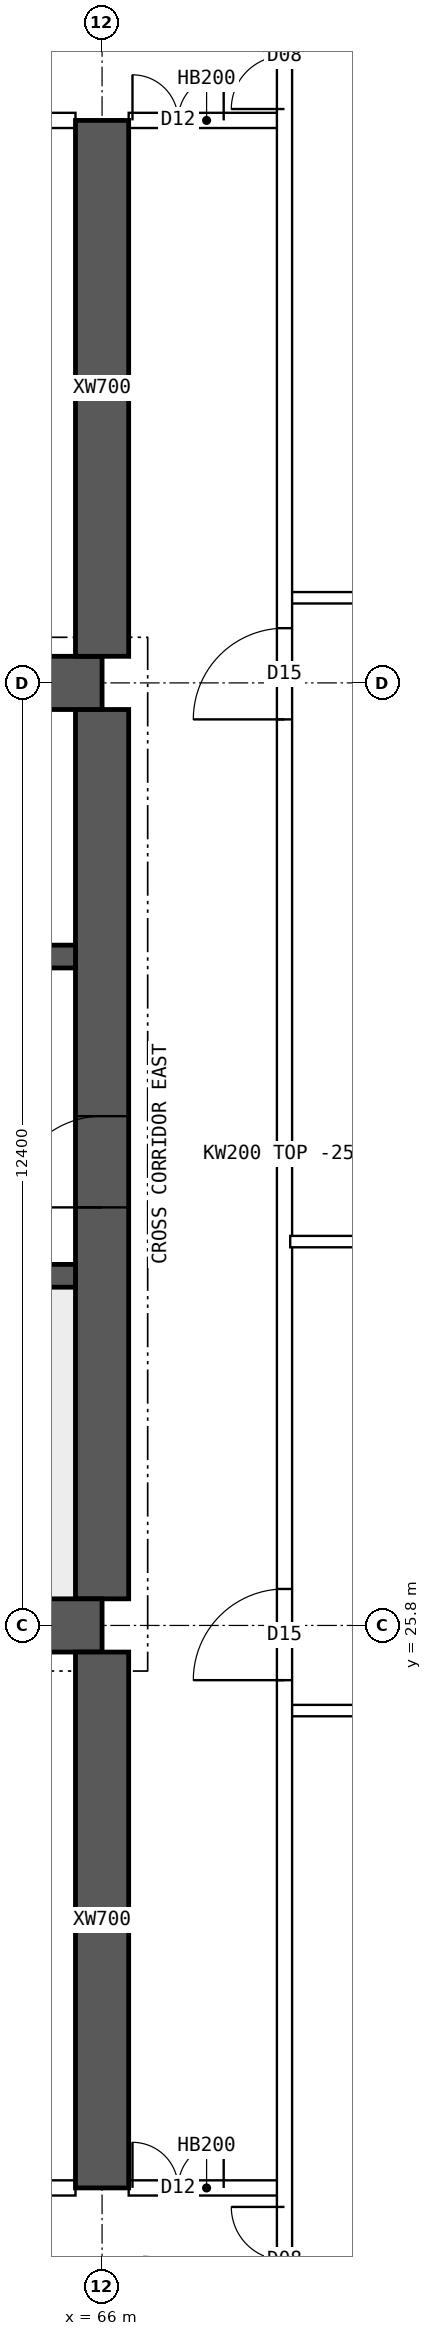
"""IFC4 building model, lengths in metres.
Left out: names, types, materials, properties, quantities, classifications, styles, units other than length and angle.
Written with IfcOpenShell. Run it as: python <this file> out.ifc"""

import sys

from ifc_helpers import new_model, si_unit, direction, frame, frame_2d, origin, place, context, subcontext, project, spatial, polyline, rectangle, outline, extrude, element, fill, save


model = new_model("IFC4")
c1 = context("Model", 3, precision=1e-05, world=origin(), true_north=direction((0.0, 1.0)))
c2 = subcontext(c1, "Body", "Model", "MODEL_VIEW")
j1 = project(units=[si_unit("LENGTHUNIT", "METRE"), si_unit("PLANEANGLEUNIT", "RADIAN")], contexts=[c1])
p1 = place(None, origin())
s1 = spatial("IfcSite", under=j1, at=p1, CompositionType="ELEMENT")
p2 = place(p1, origin())
s2 = spatial("IfcBuilding", under=s1, at=p2, CompositionType="ELEMENT")
p3 = place(p2, frame((0.0, 0.0, 220.3)))
s3 = spatial("IfcBuildingStorey", under=s2, at=p3, CompositionType="ELEMENT", Elevation=220.3)
for number, where, z_axis, x_axis in (
    (1, (18.0, 25.8, 0.0), (0.0, 0.0, 1.0), (1.0, 0.0, 0.0)),
    (2, (18.0, 38.2, 0.0), (0.0, 0.0, 1.0), (1.0, 0.0, 0.0)),
):
    element("IfcWall", number, at=place(p3, frame(where, z_axis=z_axis, x_axis=x_axis)), inside=s3, PredefinedType="SHEAR", context=c2, shape_type="SweptSolid", body=[
        extrude(rectangle(XDim=48.0, YDim=0.7, at=frame_2d((24.0, 0.0))), origin(), (0.0, 0.0, 1.0), 3.75),
    ])
p4 = place(p3, frame((66.0, 26.15, 0.0), z_axis=(0.0, 0.0, 1.0), x_axis=(0.0, 1.0, 0.0)))
e3 = element("IfcWall", 3, at=p4, inside=s3, PredefinedType="SHEAR", context=c2, shape_type="SweptSolid", body=[
    extrude(rectangle(XDim=11.7, YDim=0.7, at=frame_2d((5.85, 0.0))), origin(), (0.0, 0.0, 1.0), 3.75),
])
p5 = place(p4, frame((5.15, 0.0, 0.0)))
e4 = element("IfcOpeningElement", 4, at=p5, cuts=e3, PredefinedType="OPENING", context=c2, shape_type="SweptSolid", body=[
    extrude(rectangle(XDim=1.2, YDim=2.1, at=frame_2d((0.6, 1.05))), frame((0.0, 0.36, 0.0), z_axis=(0.0, -1.0, 0.0), x_axis=(1.0, 0.0, 0.0)), (0.0, 0.0, 1.0), 0.72),
])
p6 = place(p3, frame((18.35, 30.4, 0.0), z_axis=(0.0, 0.0, 1.0), x_axis=(1.0, 0.0, 0.0)))
e5 = element("IfcWall", 5, at=p6, inside=s3, PredefinedType="SHEAR", context=c2, shape_type="SweptSolid", body=[
    extrude(rectangle(XDim=47.3, YDim=0.3, at=frame_2d((23.65, 0.0))), origin(), (0.0, 0.0, 1.0), 3.75),
])
p7 = place(p6, frame((0.4, 0.0, 0.0)))
e6 = element("IfcOpeningElement", 6, at=p7, cuts=e5, PredefinedType="OPENING", context=c2, shape_type="SweptSolid", body=[
    extrude(rectangle(XDim=1.0, YDim=2.1, at=frame_2d((0.5, 1.05))), frame((0.0, 0.16, 0.0), z_axis=(0.0, -1.0, 0.0), x_axis=(1.0, 0.0, 0.0)), (0.0, 0.0, 1.0), 0.32),
])
p8 = place(p6, frame((45.9, 0.0, 0.0)))
e7 = element("IfcOpeningElement", 7, at=p8, cuts=e5, PredefinedType="OPENING", context=c2, shape_type="SweptSolid", body=[
    extrude(rectangle(XDim=1.0, YDim=2.1, at=frame_2d((0.5, 1.05))), frame((0.0, 0.16, 0.0), z_axis=(0.0, -1.0, 0.0), x_axis=(1.0, 0.0, 0.0)), (0.0, 0.0, 1.0), 0.32),
])
p9 = place(p6, frame((8.4, 0.0, 0.0)))
e8 = element("IfcOpeningElement", 8, at=p9, cuts=e5, PredefinedType="OPENING", context=c2, shape_type="SweptSolid", body=[
    extrude(rectangle(XDim=1.1, YDim=2.1, at=frame_2d((0.55, 1.05))), frame((0.0, 0.16, 0.0), z_axis=(0.0, -1.0, 0.0), x_axis=(1.0, 0.0, 0.0)), (0.0, 0.0, 1.0), 0.32),
])
p10 = place(p6, frame((11.0, 0.0, 0.0)))
e9 = element("IfcOpeningElement", 9, at=p10, cuts=e5, PredefinedType="OPENING", context=c2, shape_type="SweptSolid", body=[
    extrude(rectangle(XDim=1.1, YDim=2.1, at=frame_2d((0.55, 1.05))), frame((0.0, 0.16, 0.0), z_axis=(0.0, -1.0, 0.0), x_axis=(1.0, 0.0, 0.0)), (0.0, 0.0, 1.0), 0.32),
])
p11 = place(p6, frame((13.6, 0.0, 0.0)))
e10 = element("IfcOpeningElement", 10, at=p11, cuts=e5, PredefinedType="OPENING", context=c2, shape_type="SweptSolid", body=[
    extrude(rectangle(XDim=1.1, YDim=2.1, at=frame_2d((0.55, 1.05))), frame((0.0, 0.16, 0.0), z_axis=(0.0, -1.0, 0.0), x_axis=(1.0, 0.0, 0.0)), (0.0, 0.0, 1.0), 0.32),
])
p12 = place(p6, frame((16.2, 0.0, 0.0)))
e11 = element("IfcOpeningElement", 11, at=p12, cuts=e5, PredefinedType="OPENING", context=c2, shape_type="SweptSolid", body=[
    extrude(rectangle(XDim=1.1, YDim=2.1, at=frame_2d((0.55, 1.05))), frame((0.0, 0.16, 0.0), z_axis=(0.0, -1.0, 0.0), x_axis=(1.0, 0.0, 0.0)), (0.0, 0.0, 1.0), 0.32),
])
p13 = place(p6, frame((18.975, 0.0, 0.0)))
e12 = element("IfcOpeningElement", 12, at=p13, cuts=e5, PredefinedType="OPENING", context=c2, shape_type="SweptSolid", body=[
    extrude(rectangle(XDim=0.9, YDim=2.1, at=frame_2d((0.45, 1.05))), frame((0.0, 0.16, 0.0), z_axis=(0.0, -1.0, 0.0), x_axis=(1.0, 0.0, 0.0)), (0.0, 0.0, 1.0), 0.32),
])
p14 = place(p6, frame((24.475, 0.0, 0.0)))
e13 = element("IfcOpeningElement", 13, at=p14, cuts=e5, PredefinedType="OPENING", context=c2, shape_type="SweptSolid", body=[
    extrude(rectangle(XDim=0.9, YDim=2.1, at=frame_2d((0.45, 1.05))), frame((0.0, 0.16, 0.0), z_axis=(0.0, -1.0, 0.0), x_axis=(1.0, 0.0, 0.0)), (0.0, 0.0, 1.0), 0.32),
])
p15 = place(p6, frame((30.267, 0.0, 0.0)))
e14 = element("IfcOpeningElement", 14, at=p15, cuts=e5, PredefinedType="OPENING", context=c2, shape_type="SweptSolid", body=[
    extrude(rectangle(XDim=1.1, YDim=2.1, at=frame_2d((0.55, 1.05))), frame((0.0, 0.16, 0.0), z_axis=(0.0, -1.0, 0.0), x_axis=(1.0, 0.0, 0.0)), (0.0, 0.0, 1.0), 0.32),
])
p16 = place(p6, frame((33.8, 0.0, 0.0)))
e15 = element("IfcOpeningElement", 15, at=p16, cuts=e5, PredefinedType="OPENING", context=c2, shape_type="SweptSolid", body=[
    extrude(rectangle(XDim=1.1, YDim=2.1, at=frame_2d((0.55, 1.05))), frame((0.0, 0.16, 0.0), z_axis=(0.0, -1.0, 0.0), x_axis=(1.0, 0.0, 0.0)), (0.0, 0.0, 1.0), 0.32),
])
p17 = place(p6, frame((37.333, 0.0, 0.0)))
e16 = element("IfcOpeningElement", 16, at=p17, cuts=e5, PredefinedType="OPENING", context=c2, shape_type="SweptSolid", body=[
    extrude(rectangle(XDim=1.1, YDim=2.1, at=frame_2d((0.55, 1.05))), frame((0.0, 0.16, 0.0), z_axis=(0.0, -1.0, 0.0), x_axis=(1.0, 0.0, 0.0)), (0.0, 0.0, 1.0), 0.32),
])
p18 = place(p3, frame((18.35, 34.6, 0.0), z_axis=(0.0, 0.0, 1.0), x_axis=(1.0, 0.0, 0.0)))
e17 = element("IfcWall", 17, at=p18, inside=s3, PredefinedType="SHEAR", context=c2, shape_type="SweptSolid", body=[
    extrude(rectangle(XDim=47.3, YDim=0.3, at=frame_2d((23.65, 0.0))), origin(), (0.0, 0.0, 1.0), 3.75),
])
p19 = place(p18, frame((0.9, 0.0, 0.0)))
e18 = element("IfcOpeningElement", 18, at=p19, cuts=e17, PredefinedType="OPENING", context=c2, shape_type="SweptSolid", body=[
    extrude(rectangle(XDim=1.1, YDim=2.1, at=frame_2d((0.55, 1.05))), frame((0.0, 0.16, 0.0), z_axis=(0.0, -1.0, 0.0), x_axis=(1.0, 0.0, 0.0)), (0.0, 0.0, 1.0), 0.32),
])
p20 = place(p18, frame((45.3, 0.0, 0.0)))
e19 = element("IfcOpeningElement", 19, at=p20, cuts=e17, PredefinedType="OPENING", context=c2, shape_type="SweptSolid", body=[
    extrude(rectangle(XDim=1.1, YDim=2.1, at=frame_2d((0.55, 1.05))), frame((0.0, 0.16, 0.0), z_axis=(0.0, -1.0, 0.0), x_axis=(1.0, 0.0, 0.0)), (0.0, 0.0, 1.0), 0.32),
])
p21 = place(p18, frame((4.25, 0.0, 0.0)))
e20 = element("IfcOpeningElement", 20, at=p21, cuts=e17, PredefinedType="OPENING", context=c2, shape_type="SweptSolid", body=[
    extrude(rectangle(XDim=0.9, YDim=2.1, at=frame_2d((0.45, 1.05))), frame((0.0, 0.16, 0.0), z_axis=(0.0, -1.0, 0.0), x_axis=(1.0, 0.0, 0.0)), (0.0, 0.0, 1.0), 0.32),
])
p22 = place(p18, frame((42.15, 0.0, 0.0)))
e21 = element("IfcOpeningElement", 21, at=p22, cuts=e17, PredefinedType="OPENING", context=c2, shape_type="SweptSolid", body=[
    extrude(rectangle(XDim=0.9, YDim=2.1, at=frame_2d((0.45, 1.05))), frame((0.0, 0.16, 0.0), z_axis=(0.0, -1.0, 0.0), x_axis=(1.0, 0.0, 0.0)), (0.0, 0.0, 1.0), 0.32),
])
p23 = place(p18, frame((9.025, 0.0, 0.0)))
e22 = element("IfcOpeningElement", 22, at=p23, cuts=e17, PredefinedType="OPENING", context=c2, shape_type="SweptSolid", body=[
    extrude(rectangle(XDim=0.9, YDim=2.1, at=frame_2d((0.45, 1.05))), frame((0.0, 0.16, 0.0), z_axis=(0.0, -1.0, 0.0), x_axis=(1.0, 0.0, 0.0)), (0.0, 0.0, 1.0), 0.32),
])
p24 = place(p18, frame((12.999, 0.0, 0.0)))
e23 = element("IfcOpeningElement", 23, at=p24, cuts=e17, PredefinedType="OPENING", context=c2, shape_type="SweptSolid", body=[
    extrude(rectangle(XDim=0.9, YDim=2.1, at=frame_2d((0.45, 1.05))), frame((0.0, 0.16, 0.0), z_axis=(0.0, -1.0, 0.0), x_axis=(1.0, 0.0, 0.0)), (0.0, 0.0, 1.0), 0.32),
])
p25 = place(p18, frame((16.646, 0.0, 0.0)))
e24 = element("IfcOpeningElement", 24, at=p25, cuts=e17, PredefinedType="OPENING", context=c2, shape_type="SweptSolid", body=[
    extrude(rectangle(XDim=0.9, YDim=2.1, at=frame_2d((0.45, 1.05))), frame((0.0, 0.16, 0.0), z_axis=(0.0, -1.0, 0.0), x_axis=(1.0, 0.0, 0.0)), (0.0, 0.0, 1.0), 0.32),
])
p26 = place(p18, frame((20.405, 0.0, 0.0)))
e25 = element("IfcOpeningElement", 25, at=p26, cuts=e17, PredefinedType="OPENING", context=c2, shape_type="SweptSolid", body=[
    extrude(rectangle(XDim=0.9, YDim=2.1, at=frame_2d((0.45, 1.05))), frame((0.0, 0.16, 0.0), z_axis=(0.0, -1.0, 0.0), x_axis=(1.0, 0.0, 0.0)), (0.0, 0.0, 1.0), 0.32),
])
p27 = place(p18, frame((24.811, 0.0, 0.0)))
e26 = element("IfcOpeningElement", 26, at=p27, cuts=e17, PredefinedType="OPENING", context=c2, shape_type="SweptSolid", body=[
    extrude(rectangle(XDim=0.9, YDim=2.1, at=frame_2d((0.45, 1.05))), frame((0.0, 0.16, 0.0), z_axis=(0.0, -1.0, 0.0), x_axis=(1.0, 0.0, 0.0)), (0.0, 0.0, 1.0), 0.32),
])
p28 = place(p18, frame((27.608, 0.0, 0.0)))
e27 = element("IfcOpeningElement", 27, at=p28, cuts=e17, PredefinedType="OPENING", context=c2, shape_type="SweptSolid", body=[
    extrude(rectangle(XDim=0.9, YDim=2.1, at=frame_2d((0.45, 1.05))), frame((0.0, 0.16, 0.0), z_axis=(0.0, -1.0, 0.0), x_axis=(1.0, 0.0, 0.0)), (0.0, 0.0, 1.0), 0.32),
])
p29 = place(p18, frame((29.575, 0.0, 0.0)))
e28 = element("IfcOpeningElement", 28, at=p29, cuts=e17, PredefinedType="OPENING", context=c2, shape_type="SweptSolid", body=[
    extrude(rectangle(XDim=0.9, YDim=2.1, at=frame_2d((0.45, 1.05))), frame((0.0, 0.16, 0.0), z_axis=(0.0, -1.0, 0.0), x_axis=(1.0, 0.0, 0.0)), (0.0, 0.0, 1.0), 0.32),
])
p30 = place(p18, frame((32.007, 0.0, 0.0)))
e29 = element("IfcOpeningElement", 29, at=p30, cuts=e17, PredefinedType="OPENING", context=c2, shape_type="SweptSolid", body=[
    extrude(rectangle(XDim=0.9, YDim=2.1, at=frame_2d((0.45, 1.05))), frame((0.0, 0.16, 0.0), z_axis=(0.0, -1.0, 0.0), x_axis=(1.0, 0.0, 0.0)), (0.0, 0.0, 1.0), 0.32),
])
p31 = place(p18, frame((34.742, 0.0, 0.0)))
e30 = element("IfcOpeningElement", 30, at=p31, cuts=e17, PredefinedType="OPENING", context=c2, shape_type="SweptSolid", body=[
    extrude(rectangle(XDim=0.9, YDim=2.1, at=frame_2d((0.45, 1.05))), frame((0.0, 0.16, 0.0), z_axis=(0.0, -1.0, 0.0), x_axis=(1.0, 0.0, 0.0)), (0.0, 0.0, 1.0), 0.32),
])
p32 = place(p18, frame((37.781, 0.0, 0.0)))
e31 = element("IfcOpeningElement", 31, at=p32, cuts=e17, PredefinedType="OPENING", context=c2, shape_type="SweptSolid", body=[
    extrude(rectangle(XDim=0.9, YDim=2.1, at=frame_2d((0.45, 1.05))), frame((0.0, 0.16, 0.0), z_axis=(0.0, -1.0, 0.0), x_axis=(1.0, 0.0, 0.0)), (0.0, 0.0, 1.0), 0.32),
])
for number, where, z_axis, x_axis in (
    (32, (66.0, 18.4, 0.0), (0.0, 0.0, 1.0), (0.0, 1.0, 0.0)),
    (33, (66.0, 38.55, 0.0), (0.0, 0.0, 1.0), (0.0, 1.0, 0.0)),
):
    element("IfcWall", number, at=place(p3, frame(where, z_axis=z_axis, x_axis=x_axis)), inside=s3, PredefinedType="SHEAR", context=c2, shape_type="SweptSolid", body=[
        extrude(rectangle(XDim=7.05, YDim=0.7, at=frame_2d((3.525, 0.0))), origin(), (0.0, 0.0, 1.0), 3.75),
    ])
p33 = place(p3, frame((60.35, 18.4, 0.0), z_axis=(0.0, 0.0, 1.0), x_axis=(1.0, 0.0, 0.0)))
e34 = element("IfcWall", 34, at=p33, inside=s3, PredefinedType="SOLIDWALL", context=c2, shape_type="SweptSolid", body=[
    extrude(rectangle(XDim=5.3, YDim=0.2, at=frame_2d((2.65, 0.0))), origin(), (0.0, 0.0, 1.0), 3.5),
])
p34 = place(p33, frame((0.15, 0.0, 0.0)))
e35 = element("IfcOpeningElement", 35, at=p34, cuts=e34, PredefinedType="OPENING", context=c2, shape_type="SweptSolid", body=[
    extrude(rectangle(XDim=0.9, YDim=2.1, at=frame_2d((0.45, 1.05))), frame((0.0, 0.11, 0.0), z_axis=(0.0, -1.0, 0.0), x_axis=(1.0, 0.0, 0.0)), (0.0, 0.0, 1.0), 0.22),
])
p35 = place(p33, frame((2.29, 0.0, 0.0)))
e36 = element("IfcOpeningElement", 36, at=p35, cuts=e34, PredefinedType="OPENING", context=c2, shape_type="SweptSolid", body=[
    extrude(rectangle(XDim=0.9, YDim=2.1, at=frame_2d((0.45, 1.05))), frame((0.0, 0.11, 0.0), z_axis=(0.0, -1.0, 0.0), x_axis=(1.0, 0.0, 0.0)), (0.0, 0.0, 1.0), 0.22),
])
p36 = place(p3, frame((66.35, 18.4, 0.0), z_axis=(0.0, 0.0, 1.0), x_axis=(1.0, 0.0, 0.0)))
e37 = element("IfcWall", 37, at=p36, inside=s3, PredefinedType="SOLIDWALL", context=c2, shape_type="SweptSolid", body=[
    extrude(rectangle(XDim=2.05, YDim=0.2, at=frame_2d((1.025, 0.0))), origin(), (0.0, 0.0, 1.0), 3.5),
])
p37 = place(p36, frame((0.05, 0.0, 0.0)))
e38 = element("IfcOpeningElement", 38, at=p37, cuts=e37, PredefinedType="OPENING", context=c2, shape_type="SweptSolid", body=[
    extrude(rectangle(XDim=1.2, YDim=2.1, at=frame_2d((0.6, 1.05))), frame((0.0, 0.11, 0.0), z_axis=(0.0, -1.0, 0.0), x_axis=(1.0, 0.0, 0.0)), (0.0, 0.0, 1.0), 0.22),
])
p38 = place(p3, frame((60.35, 45.6, 0.0), z_axis=(0.0, 0.0, 1.0), x_axis=(1.0, 0.0, 0.0)))
e39 = element("IfcWall", 39, at=p38, inside=s3, PredefinedType="SOLIDWALL", context=c2, shape_type="SweptSolid", body=[
    extrude(rectangle(XDim=5.3, YDim=0.2, at=frame_2d((2.65, 0.0))), origin(), (0.0, 0.0, 1.0), 3.5),
])
p39 = place(p38, frame((0.15, 0.0, 0.0)))
e40 = element("IfcOpeningElement", 40, at=p39, cuts=e39, PredefinedType="OPENING", context=c2, shape_type="SweptSolid", body=[
    extrude(rectangle(XDim=0.9, YDim=2.1, at=frame_2d((0.45, 1.05))), frame((0.0, 0.11, 0.0), z_axis=(0.0, -1.0, 0.0), x_axis=(1.0, 0.0, 0.0)), (0.0, 0.0, 1.0), 0.22),
])
p40 = place(p38, frame((3.635, 0.0, 0.0)))
e41 = element("IfcOpeningElement", 41, at=p40, cuts=e39, PredefinedType="OPENING", context=c2, shape_type="SweptSolid", body=[
    extrude(rectangle(XDim=0.9, YDim=2.1, at=frame_2d((0.45, 1.05))), frame((0.0, 0.11, 0.0), z_axis=(0.0, -1.0, 0.0), x_axis=(1.0, 0.0, 0.0)), (0.0, 0.0, 1.0), 0.22),
])
p41 = place(p3, frame((66.35, 45.6, 0.0), z_axis=(0.0, 0.0, 1.0), x_axis=(1.0, 0.0, 0.0)))
e42 = element("IfcWall", 42, at=p41, inside=s3, PredefinedType="SOLIDWALL", context=c2, shape_type="SweptSolid", body=[
    extrude(rectangle(XDim=2.05, YDim=0.2, at=frame_2d((1.025, 0.0))), origin(), (0.0, 0.0, 1.0), 3.5),
])
p42 = place(p41, frame((0.05, 0.0, 0.0)))
e43 = element("IfcOpeningElement", 43, at=p42, cuts=e42, PredefinedType="OPENING", context=c2, shape_type="SweptSolid", body=[
    extrude(rectangle(XDim=1.2, YDim=2.1, at=frame_2d((0.6, 1.05))), frame((0.0, 0.11, 0.0), z_axis=(0.0, -1.0, 0.0), x_axis=(1.0, 0.0, 0.0)), (0.0, 0.0, 1.0), 0.22),
])
p43 = place(p3, frame((68.475, 30.85, 0.0), z_axis=(0.0, 0.0, 1.0), x_axis=(1.0, 0.0, 0.0)))
e44 = element("IfcWall", 44, at=p43, inside=s3, PredefinedType="PARTITIONING", context=c2, shape_type="SweptSolid", body=[
    extrude(outline(polyline([(0.0, 0.0), (6.82, 0.0), (6.82, 3.5), (3.827, 3.5), (3.825, 3.05), (3.227, 3.05), (3.225, 3.5), (0.0, 3.5), (0.0, 0.0)])), frame((0.0, 0.075, 0.0), z_axis=(0.0, -1.0, 0.0), x_axis=(1.0, 0.0, 0.0)), (0.0, 0.0, 1.0), 0.15),
])
p44 = place(p3, frame((68.4, 11.646, 0.0), z_axis=(0.0, 0.0, 1.0), x_axis=(0.0, 1.0, 0.0)))
e45 = element("IfcWall", 45, at=p44, inside=s3, PredefinedType="SOLIDWALL", context=c2, shape_type="SweptSolid", body=[
    extrude(rectangle(XDim=40.708, YDim=0.2, at=frame_2d((20.354, 0.0))), origin(), (0.0, 0.0, 1.0), 3.5),
])
p45 = place(p44, frame((13.434, 0.0, 0.0)))
e46 = element("IfcOpeningElement", 46, at=p45, cuts=e45, PredefinedType="OPENING", context=c2, shape_type="SweptSolid", body=[
    extrude(rectangle(XDim=1.2, YDim=2.1, at=frame_2d((0.6, 1.05))), frame((0.0, 0.11, 0.0), z_axis=(0.0, -1.0, 0.0), x_axis=(1.0, 0.0, 0.0)), (0.0, 0.0, 1.0), 0.22),
])
p46 = place(p44, frame((26.074, 0.0, 0.0)))
e47 = element("IfcOpeningElement", 47, at=p46, cuts=e45, PredefinedType="OPENING", context=c2, shape_type="SweptSolid", body=[
    extrude(rectangle(XDim=1.2, YDim=2.1, at=frame_2d((0.6, 1.05))), frame((0.0, 0.11, 0.0), z_axis=(0.0, -1.0, 0.0), x_axis=(1.0, 0.0, 0.0)), (0.0, 0.0, 1.0), 0.22),
])
p47 = place(p44, frame((5.104, 0.0, 0.0)))
e48 = element("IfcOpeningElement", 48, at=p47, cuts=e45, PredefinedType="OPENING", context=c2, shape_type="SweptSolid", body=[
    extrude(rectangle(XDim=1.4, YDim=2.1, at=frame_2d((0.7, 1.05))), frame((0.0, 0.11, 0.0), z_axis=(0.0, -1.0, 0.0), x_axis=(1.0, 0.0, 0.0)), (0.0, 0.0, 1.0), 0.22),
])
p48 = place(p44, frame((34.104, 0.0, 0.0)))
e49 = element("IfcOpeningElement", 49, at=p48, cuts=e45, PredefinedType="OPENING", context=c2, shape_type="SweptSolid", body=[
    extrude(rectangle(XDim=1.4, YDim=2.1, at=frame_2d((0.7, 1.05))), frame((0.0, 0.11, 0.0), z_axis=(0.0, -1.0, 0.0), x_axis=(1.0, 0.0, 0.0)), (0.0, 0.0, 1.0), 0.22),
])
for number, where, z_axis, x_axis in (
    (50, (68.475, 24.68, 0.0), (0.0, 0.0, 1.0), (1.0, 0.0, 0.0)),
    (51, (68.475, 39.32, 0.0), (0.0, 0.0, 1.0), (1.0, 0.0, 0.0)),
):
    element("IfcWall", number, at=place(p3, frame(where, z_axis=z_axis, x_axis=x_axis)), inside=s3, PredefinedType="PARTITIONING", context=c2, shape_type="SweptSolid", body=[
        extrude(rectangle(XDim=6.82, YDim=0.15, at=frame_2d((3.41, 0.0))), origin(), (0.0, 0.0, 1.0), 3.5),
    ])
p49 = place(p5, origin())
e52 = element("IfcDoor", 52, at=p49, inside=s3, OperationType="SINGLE_SWING_LEFT", PredefinedType="DOOR", context=c2, shape_type="SweptSolid", body=[
    extrude(rectangle(XDim=1.2, YDim=2.1, at=frame_2d((0.6, 1.05))), frame((0.0, 0.025, 0.0), z_axis=(0.0, -1.0, 0.0), x_axis=(1.0, 0.0, 0.0)), (0.0, 0.0, 1.0), 0.05),
])
fill(e4, e52)
p50 = place(p37, origin())
e53 = element("IfcDoor", 53, at=p50, inside=s3, OperationType="DOUBLE_DOOR_SINGLE_SWING", PredefinedType="DOOR", context=c2, shape_type="SweptSolid", body=[
    extrude(rectangle(XDim=1.2, YDim=2.1, at=frame_2d((0.6, 1.05))), frame((0.0, 0.025, 0.0), z_axis=(0.0, -1.0, 0.0), x_axis=(1.0, 0.0, 0.0)), (0.0, 0.0, 1.0), 0.05),
])
fill(e38, e53)
p51 = place(p42, origin())
e54 = element("IfcDoor", 54, at=p51, inside=s3, OperationType="DOUBLE_DOOR_SINGLE_SWING", PredefinedType="DOOR", context=c2, shape_type="SweptSolid", body=[
    extrude(rectangle(XDim=1.2, YDim=2.1, at=frame_2d((0.6, 1.05))), frame((0.0, 0.025, 0.0), z_axis=(0.0, -1.0, 0.0), x_axis=(1.0, 0.0, 0.0)), (0.0, 0.0, 1.0), 0.05),
])
fill(e43, e54)
p52 = place(p45, origin())
e55 = element("IfcDoor", 55, at=p52, inside=s3, OperationType="SINGLE_SWING_LEFT", PredefinedType="DOOR", context=c2, shape_type="SweptSolid", body=[
    extrude(rectangle(XDim=1.2, YDim=2.1, at=frame_2d((0.6, 1.05))), frame((0.0, 0.025, 0.0), z_axis=(0.0, -1.0, 0.0), x_axis=(1.0, 0.0, 0.0)), (0.0, 0.0, 1.0), 0.05),
])
fill(e46, e55)
p53 = place(p46, origin())
e56 = element("IfcDoor", 56, at=p53, inside=s3, OperationType="SINGLE_SWING_LEFT", PredefinedType="DOOR", context=c2, shape_type="SweptSolid", body=[
    extrude(rectangle(XDim=1.2, YDim=2.1, at=frame_2d((0.6, 1.05))), frame((0.0, 0.025, 0.0), z_axis=(0.0, -1.0, 0.0), x_axis=(1.0, 0.0, 0.0)), (0.0, 0.0, 1.0), 0.05),
])
fill(e47, e56)
p54 = place(p47, origin())
e57 = element("IfcDoor", 57, at=p54, inside=s3, OperationType="DOUBLE_DOOR_SINGLE_SWING", PredefinedType="DOOR", context=c2, shape_type="SweptSolid", body=[
    extrude(rectangle(XDim=1.4, YDim=2.1, at=frame_2d((0.7, 1.05))), frame((0.0, 0.025, 0.0), z_axis=(0.0, -1.0, 0.0), x_axis=(1.0, 0.0, 0.0)), (0.0, 0.0, 1.0), 0.05),
])
fill(e48, e57)
p55 = place(p48, origin())
e58 = element("IfcDoor", 58, at=p55, inside=s3, OperationType="DOUBLE_DOOR_SINGLE_SWING", PredefinedType="DOOR", context=c2, shape_type="SweptSolid", body=[
    extrude(rectangle(XDim=1.4, YDim=2.1, at=frame_2d((0.7, 1.05))), frame((0.0, 0.025, 0.0), z_axis=(0.0, -1.0, 0.0), x_axis=(1.0, 0.0, 0.0)), (0.0, 0.0, 1.0), 0.05),
])
fill(e49, e58)
save(model, sys.argv[1])
